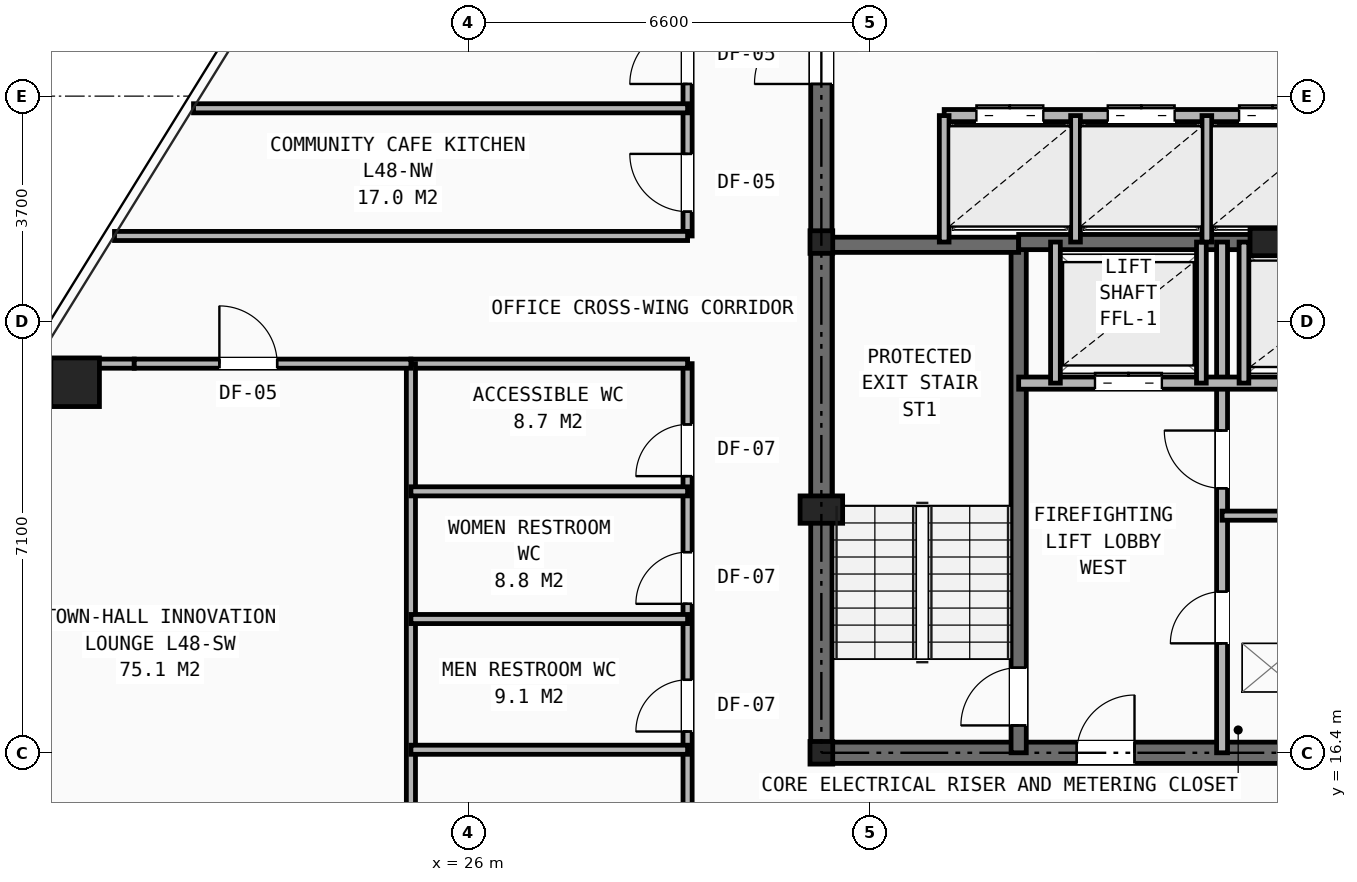
"""IFC4 building model, lengths in metres.
Left out: names, types, materials, properties, quantities, classifications, styles, units other than length and angle.
Written with IfcOpenShell. Run it as: python <this file> out.ifc"""

import sys

from ifc_helpers import new_model, si_unit, direction, frame, frame_2d, origin, origin_2d, place, context, subcontext, project, spatial, rectangle, hollow_rectangle, i_section, extrude, element, fill, save


model = new_model("IFC4")
c1 = context("Model", 3, precision=1e-05, world=origin(), true_north=direction((0.0, 1.0)))
c2 = subcontext(c1, "Body", "Model", "MODEL_VIEW")
j1 = project(units=[si_unit("LENGTHUNIT", "METRE"), si_unit("PLANEANGLEUNIT", "RADIAN")], contexts=[c1])
p1 = place(None, origin())
s1 = spatial("IfcSite", under=j1, at=p1, CompositionType="ELEMENT")
p2 = place(p1, origin())
s2 = spatial("IfcBuilding", under=s1, at=p2, CompositionType="ELEMENT")
p3 = place(p2, frame((0.0, 0.0, 168.9)))
s3 = spatial("IfcBuildingStorey", under=s2, at=p3, CompositionType="ELEMENT", Elevation=168.9)
for number, where, z_axis, x_axis in (
    (1, (31.8, 16.4, 0.0), (0.0, 0.0, 1.0), (1.0, 0.0, 0.0)),
    (2, (31.8, 24.8, 0.0), (0.0, 0.0, 1.0), (1.0, 0.0, 0.0)),
):
    element("IfcColumn", number, at=place(p3, frame(where, z_axis=z_axis, x_axis=x_axis)), inside=s3, PredefinedType="COLUMN", context=c2, shape_type="SweptSolid", body=[
        extrude(i_section(OverallWidth=0.374, OverallDepth=0.372, WebThickness=0.016, FlangeThickness=0.026, at=origin_2d()), origin(), (0.0, 0.0, 1.0), 3.45),
    ])
for number, where, z_axis, x_axis in (
    (3, (31.8, 20.4, 0.0), (0.0, 0.0, 1.0), (1.0, 0.0, 0.0)),
    (4, (39.2, 24.8, 0.0), (0.0, 0.0, 1.0), (1.0, 0.0, 0.0)),
):
    element("IfcColumn", number, at=place(p3, frame(where, z_axis=z_axis, x_axis=x_axis)), inside=s3, PredefinedType="PILASTER", context=c2, shape_type="SweptSolid", body=[
        extrude(rectangle(XDim=0.7, YDim=0.45, at=origin_2d()), origin(), (0.0, 0.0, 1.0), 3.45),
    ])
p4 = place(p3, frame((19.527, 22.494, 0.0), z_axis=(0.0, 0.0, 1.0), x_axis=(1.0, 0.0, 0.0)))
e5 = element("IfcColumn", 5, at=p4, inside=s3, PredefinedType="COLUMN", context=c2, shape_type="SweptSolid", body=[
    extrude(hollow_rectangle(XDim=0.8, YDim=0.8, WallThickness=0.055, at=origin_2d()), origin(), (0.0, 0.0, 1.0), 3.45),
])
p5 = place(p3, frame((31.8, 16.4, 0.0), z_axis=(0.0, 0.0, 1.0), x_axis=(1.0, 0.0, 0.0)))
e6 = element("IfcWall", 6, at=p5, inside=s3, PredefinedType="SHEAR", context=c2, shape_type="SweptSolid", body=[
    extrude(rectangle(XDim=16.4, YDim=0.35, at=frame_2d((8.2, 0.0))), origin(), (0.0, 0.0, 1.0), 3.21),
])
p6 = place(p5, frame((4.2, 0.0, 0.0)))
e7 = element("IfcOpeningElement", 7, at=p6, cuts=e6, PredefinedType="OPENING", context=c2, shape_type="SweptSolid", body=[
    extrude(rectangle(XDim=0.95, YDim=2.1, at=frame_2d((0.475, 1.05))), frame((0.0, 0.185, 0.0), z_axis=(0.0, -1.0, 0.0), x_axis=(1.0, 0.0, 0.0)), (0.0, 0.0, 1.0), 0.37),
])
p7 = place(p5, frame((10.6, 0.0, 0.0)))
e8 = element("IfcOpeningElement", 8, at=p7, cuts=e6, PredefinedType="OPENING", context=c2, shape_type="SweptSolid", body=[
    extrude(rectangle(XDim=0.95, YDim=2.1, at=frame_2d((0.475, 1.05))), frame((0.0, 0.185, 0.0), z_axis=(0.0, -1.0, 0.0), x_axis=(1.0, 0.0, 0.0)), (0.0, 0.0, 1.0), 0.37),
])
p8 = place(p3, frame((31.8, 16.4, 0.0), z_axis=(0.0, 0.0, 1.0), x_axis=(0.0, 1.0, 0.0)))
e9 = element("IfcWall", 9, at=p8, inside=s3, PredefinedType="SHEAR", context=c2, shape_type="SweptSolid", body=[
    extrude(rectangle(XDim=14.8, YDim=0.35, at=frame_2d((7.4, 0.0))), origin(), (0.0, 0.0, 1.0), 3.21),
])
p9 = place(p8, frame((11.0, 0.0, 0.0)))
e10 = element("IfcOpeningElement", 10, at=p9, cuts=e9, PredefinedType="OPENING", context=c2, shape_type="SweptSolid", body=[
    extrude(rectangle(XDim=1.1, YDim=2.15, at=frame_2d((0.55, 1.075))), frame((0.0, 0.185, 0.0), z_axis=(0.0, -1.0, 0.0), x_axis=(1.0, 0.0, 0.0)), (0.0, 0.0, 1.0), 0.37),
])
p10 = place(p3, frame((35.045, 16.4, 0.0), z_axis=(0.0, 0.0, 1.0), x_axis=(0.0, 1.0, 0.0)))
e11 = element("IfcWall", 11, at=p10, inside=s3, PredefinedType="SHEAR", context=c2, shape_type="SweptSolid", body=[
    extrude(rectangle(XDim=8.4, YDim=0.25, at=frame_2d((4.2, 0.0))), origin(), (0.0, 0.0, 1.0), 3.21),
])
p11 = place(p10, frame((0.45, 0.0, 0.0)))
e12 = element("IfcOpeningElement", 12, at=p11, cuts=e11, PredefinedType="OPENING", context=c2, shape_type="SweptSolid", body=[
    extrude(rectangle(XDim=0.95, YDim=2.1, at=frame_2d((0.475, 1.05))), frame((0.0, 0.135, 0.0), z_axis=(0.0, -1.0, 0.0), x_axis=(1.0, 0.0, 0.0)), (0.0, 0.0, 1.0), 0.27),
])
p12 = place(p3, frame((31.8, 24.755, 0.0), z_axis=(0.0, 0.0, 1.0), x_axis=(1.0, 0.0, 0.0)))
e13 = element("IfcWall", 13, at=p12, inside=s3, PredefinedType="SHEAR", context=c2, shape_type="SweptSolid", body=[
    extrude(rectangle(XDim=3.245, YDim=0.25, at=frame_2d((1.623, 0.0))), origin(), (0.0, 0.0, 1.0), 3.21),
])
p13 = place(p3, frame((35.045, 24.8, 0.0), z_axis=(0.0, 0.0, 1.0), x_axis=(1.0, 0.0, 0.0)))
e14 = element("IfcWall", 14, at=p13, inside=s3, PredefinedType="SHEAR", context=c2, shape_type="SweptSolid", body=[
    extrude(rectangle(XDim=9.91, YDim=0.25, at=frame_2d((4.955, 0.0))), origin(), (0.0, 0.0, 1.0), 3.21),
])
p14 = place(p3, frame((38.39, 16.4, 0.0), z_axis=(0.0, 0.0, 1.0), x_axis=(0.0, 1.0, 0.0)))
e15 = element("IfcWall", 15, at=p14, inside=s3, PredefinedType="PARTITIONING", context=c2, shape_type="SweptSolid", body=[
    extrude(rectangle(XDim=8.4, YDim=0.18, at=frame_2d((4.2, 0.0))), origin(), (0.0, 0.0, 1.0), 2.665),
])
p15 = place(p14, frame((1.8, 0.0, 0.0)))
e16 = element("IfcOpeningElement", 16, at=p15, cuts=e15, PredefinedType="OPENING", context=c2, shape_type="SweptSolid", body=[
    extrude(rectangle(XDim=0.85, YDim=2.05, at=frame_2d((0.425, 1.025))), frame((0.0, 0.1, 0.0), z_axis=(0.0, -1.0, 0.0), x_axis=(1.0, 0.0, 0.0)), (0.0, 0.0, 1.0), 0.2),
])
p16 = place(p14, frame((4.35, 0.0, 0.0)))
e17 = element("IfcOpeningElement", 17, at=p16, cuts=e15, PredefinedType="OPENING", context=c2, shape_type="SweptSolid", body=[
    extrude(rectangle(XDim=0.95, YDim=2.1, at=frame_2d((0.475, 1.05))), frame((0.0, 0.1, 0.0), z_axis=(0.0, -1.0, 0.0), x_axis=(1.0, 0.0, 0.0)), (0.0, 0.0, 1.0), 0.2),
])
p17 = place(p3, frame((35.045, 22.48, 0.0), z_axis=(0.0, 0.0, 1.0), x_axis=(1.0, 0.0, 0.0)))
e18 = element("IfcWall", 18, at=p17, inside=s3, PredefinedType="SOLIDWALL", context=c2, shape_type="SweptSolid", body=[
    extrude(rectangle(XDim=9.91, YDim=0.2, at=frame_2d((4.955, 0.0))), origin(), (0.0, 0.0, 1.0), 3.21),
])
p18 = place(p17, frame((1.255, 0.0, 0.0)))
e19 = element("IfcOpeningElement", 19, at=p18, cuts=e18, PredefinedType="OPENING", context=c2, shape_type="SweptSolid", body=[
    extrude(rectangle(XDim=1.1, YDim=2.15, at=frame_2d((0.55, 1.075))), frame((0.0, 0.11, 0.0), z_axis=(0.0, -1.0, 0.0), x_axis=(1.0, 0.0, 0.0)), (0.0, 0.0, 1.0), 0.22),
])
p19 = place(p17, frame((7.555, 0.0, 0.0)))
e20 = element("IfcOpeningElement", 20, at=p19, cuts=e18, PredefinedType="OPENING", context=c2, shape_type="SweptSolid", body=[
    extrude(rectangle(XDim=1.1, YDim=2.15, at=frame_2d((0.55, 1.075))), frame((0.0, 0.11, 0.0), z_axis=(0.0, -1.0, 0.0), x_axis=(1.0, 0.0, 0.0)), (0.0, 0.0, 1.0), 0.22),
])
p20 = place(p17, frame((4.405, 0.0, 0.0)))
e21 = element("IfcOpeningElement", 21, at=p20, cuts=e18, PredefinedType="OPENING", context=c2, shape_type="SweptSolid", body=[
    extrude(rectangle(XDim=1.1, YDim=2.15, at=frame_2d((0.55, 1.075))), frame((0.0, 0.11, 0.0), z_axis=(0.0, -1.0, 0.0), x_axis=(1.0, 0.0, 0.0)), (0.0, 0.0, 1.0), 0.22),
])
p21 = place(p3, frame((38.39, 20.3, 0.0), z_axis=(0.0, 0.0, 1.0), x_axis=(1.0, 0.0, 0.0)))
e22 = element("IfcWall", 22, at=p21, inside=s3, PredefinedType="PARTITIONING", context=c2, shape_type="SweptSolid", body=[
    extrude(rectangle(XDim=3.22, YDim=0.15, at=frame_2d((1.61, 0.0))), origin(), (0.0, 0.0, 1.0), 3.21),
])
for number, where, z_axis, x_axis in (
    (23, (35.65, 22.48, 0.0), (0.0, 0.0, 1.0), (0.0, 1.0, 0.0)),
    (24, (38.05, 22.48, 0.0), (0.0, 0.0, 1.0), (0.0, 1.0, 0.0)),
    (25, (38.75, 22.48, 0.0), (0.0, 0.0, 1.0), (0.0, 1.0, 0.0)),
):
    element("IfcWall", number, at=place(p3, frame(where, z_axis=z_axis, x_axis=x_axis)), inside=s3, PredefinedType="SOLIDWALL", context=c2, shape_type="SweptSolid", body=[
        extrude(rectangle(XDim=2.32, YDim=0.16, at=frame_2d((1.16, 0.0))), origin(), (0.0, 0.0, 1.0), 3.21),
    ])
p22 = place(p3, frame((33.82, 26.88, 0.0), z_axis=(0.0, 0.0, 1.0), x_axis=(1.0, 0.0, 0.0)))
e26 = element("IfcWall", 26, at=p22, inside=s3, PredefinedType="SOLIDWALL", context=c2, shape_type="SweptSolid", body=[
    extrude(rectangle(XDim=14.38, YDim=0.2, at=frame_2d((7.19, 0.0))), origin(), (0.0, 0.0, 1.0), 2.665),
])
p23 = place(p22, frame((0.53, 0.0, 0.0)))
e27 = element("IfcOpeningElement", 27, at=p23, cuts=e26, PredefinedType="OPENING", context=c2, shape_type="SweptSolid", body=[
    extrude(rectangle(XDim=1.1, YDim=2.15, at=frame_2d((0.55, 1.075))), frame((0.0, 0.11, 0.0), z_axis=(0.0, -1.0, 0.0), x_axis=(1.0, 0.0, 0.0)), (0.0, 0.0, 1.0), 0.22),
])
p24 = place(p22, frame((2.69, 0.0, 0.0)))
e28 = element("IfcOpeningElement", 28, at=p24, cuts=e26, PredefinedType="OPENING", context=c2, shape_type="SweptSolid", body=[
    extrude(rectangle(XDim=1.1, YDim=2.15, at=frame_2d((0.55, 1.075))), frame((0.0, 0.11, 0.0), z_axis=(0.0, -1.0, 0.0), x_axis=(1.0, 0.0, 0.0)), (0.0, 0.0, 1.0), 0.22),
])
p25 = place(p22, frame((4.85, 0.0, 0.0)))
e29 = element("IfcOpeningElement", 29, at=p25, cuts=e26, PredefinedType="OPENING", context=c2, shape_type="SweptSolid", body=[
    extrude(rectangle(XDim=1.1, YDim=2.15, at=frame_2d((0.55, 1.075))), frame((0.0, 0.11, 0.0), z_axis=(0.0, -1.0, 0.0), x_axis=(1.0, 0.0, 0.0)), (0.0, 0.0, 1.0), 0.22),
])
p26 = place(p22, frame((7.01, 0.0, 0.0)))
e30 = element("IfcOpeningElement", 30, at=p26, cuts=e26, PredefinedType="OPENING", context=c2, shape_type="SweptSolid", body=[
    extrude(rectangle(XDim=1.1, YDim=2.15, at=frame_2d((0.55, 1.075))), frame((0.0, 0.11, 0.0), z_axis=(0.0, -1.0, 0.0), x_axis=(1.0, 0.0, 0.0)), (0.0, 0.0, 1.0), 0.22),
])
for number, where, z_axis, x_axis in (
    (31, (33.82, 24.8, 0.0), (0.0, 0.0, 1.0), (0.0, 1.0, 0.0)),
    (32, (35.98, 24.8, 0.0), (0.0, 0.0, 1.0), (0.0, 1.0, 0.0)),
    (33, (38.14, 24.8, 0.0), (0.0, 0.0, 1.0), (0.0, 1.0, 0.0)),
):
    element("IfcWall", number, at=place(p3, frame(where, z_axis=z_axis, x_axis=x_axis)), inside=s3, PredefinedType="SOLIDWALL", context=c2, shape_type="SweptSolid", body=[
        extrude(rectangle(XDim=2.08, YDim=0.16, at=frame_2d((1.04, 0.0))), origin(), (0.0, 0.0, 1.0), 3.21),
    ])
p27 = place(p3, frame((29.6, 14.1, 0.0), z_axis=(0.0, 0.0, 1.0), x_axis=(0.0, 1.0, 0.0)))
e34 = element("IfcWall", 34, at=p27, inside=s3, PredefinedType="PARTITIONING", context=c2, shape_type="SweptSolid", body=[
    extrude(rectangle(XDim=8.7, YDim=0.15, at=frame_2d((4.35, 0.0))), origin(), (0.0, 0.0, 1.0), 3.21),
])
p28 = place(p27, frame((2.65, 0.0, 0.0)))
e35 = element("IfcOpeningElement", 35, at=p28, cuts=e34, PredefinedType="OPENING", context=c2, shape_type="SweptSolid", body=[
    extrude(rectangle(XDim=0.85, YDim=2.05, at=frame_2d((0.425, 1.025))), frame((0.0, 0.085, 0.0), z_axis=(0.0, -1.0, 0.0), x_axis=(1.0, 0.0, 0.0)), (0.0, 0.0, 1.0), 0.17),
])
p29 = place(p27, frame((4.75, 0.0, 0.0)))
e36 = element("IfcOpeningElement", 36, at=p29, cuts=e34, PredefinedType="OPENING", context=c2, shape_type="SweptSolid", body=[
    extrude(rectangle(XDim=0.85, YDim=2.05, at=frame_2d((0.425, 1.025))), frame((0.0, 0.085, 0.0), z_axis=(0.0, -1.0, 0.0), x_axis=(1.0, 0.0, 0.0)), (0.0, 0.0, 1.0), 0.17),
])
p30 = place(p27, frame((6.85, 0.0, 0.0)))
e37 = element("IfcOpeningElement", 37, at=p30, cuts=e34, PredefinedType="OPENING", context=c2, shape_type="SweptSolid", body=[
    extrude(rectangle(XDim=0.85, YDim=2.05, at=frame_2d((0.425, 1.025))), frame((0.0, 0.085, 0.0), z_axis=(0.0, -1.0, 0.0), x_axis=(1.0, 0.0, 0.0)), (0.0, 0.0, 1.0), 0.17),
])
p31 = place(p3, frame((29.6, 24.9, 0.0), z_axis=(0.0, 0.0, 1.0), x_axis=(0.0, 1.0, 0.0)))
e38 = element("IfcWall", 38, at=p31, inside=s3, PredefinedType="PARTITIONING", context=c2, shape_type="SweptSolid", body=[
    extrude(rectangle(XDim=13.9, YDim=0.15, at=frame_2d((6.95, 0.0))), origin(), (0.0, 0.0, 1.0), 2.225),
])
p32 = place(p31, frame((0.4, 0.0, 0.0)))
e39 = element("IfcOpeningElement", 39, at=p32, cuts=e38, PredefinedType="OPENING", context=c2, shape_type="SweptSolid", body=[
    extrude(rectangle(XDim=0.95, YDim=2.1, at=frame_2d((0.475, 1.05))), frame((0.0, 0.085, 0.0), z_axis=(0.0, -1.0, 0.0), x_axis=(1.0, 0.0, 0.0)), (0.0, 0.0, 1.0), 0.17),
])
p33 = place(p31, frame((2.5, 0.0, 0.0)))
e40 = element("IfcOpeningElement", 40, at=p33, cuts=e38, PredefinedType="OPENING", context=c2, shape_type="SweptSolid", body=[
    extrude(rectangle(XDim=0.95, YDim=2.1, at=frame_2d((0.475, 1.05))), frame((0.0, 0.085, 0.0), z_axis=(0.0, -1.0, 0.0), x_axis=(1.0, 0.0, 0.0)), (0.0, 0.0, 1.0), 0.17),
])
p34 = place(p3, frame((18.876, 22.8, 0.0), z_axis=(0.0, 0.0, 1.0), x_axis=(1.0, 0.0, 0.0)))
e41 = element("IfcWall", 41, at=p34, inside=s3, PredefinedType="PARTITIONING", context=c2, shape_type="SweptSolid", body=[
    extrude(rectangle(XDim=1.624, YDim=0.15, at=frame_2d((0.812, 0.0))), origin(), (0.0, 0.0, 1.0), 2.589),
])
p35 = place(p3, frame((25.05, 22.8, 0.0), z_axis=(0.0, 0.0, 1.0), x_axis=(1.0, 0.0, 0.0)))
e42 = element("IfcWall", 42, at=p35, inside=s3, PredefinedType="PARTITIONING", context=c2, shape_type="SweptSolid", body=[
    extrude(rectangle(XDim=4.55, YDim=0.15, at=frame_2d((2.275, 0.0))), origin(), (0.0, 0.0, 1.0), 3.21),
])
p36 = place(p3, frame((20.175, 24.9, 0.0), z_axis=(0.0, 0.0, 1.0), x_axis=(1.0, 0.0, 0.0)))
e43 = element("IfcWall", 43, at=p36, inside=s3, PredefinedType="PARTITIONING", context=c2, shape_type="SweptSolid", body=[
    extrude(rectangle(XDim=9.425, YDim=0.15, at=frame_2d((4.712, 0.0))), origin(), (0.0, 0.0, 1.0), 2.589),
])
p37 = place(p3, frame((25.05, 14.1, 0.0), z_axis=(0.0, 0.0, 1.0), x_axis=(0.0, 1.0, 0.0)))
e44 = element("IfcWall", 44, at=p37, inside=s3, PredefinedType="PARTITIONING", context=c2, shape_type="SweptSolid", body=[
    extrude(rectangle(XDim=8.7, YDim=0.15, at=frame_2d((4.35, 0.0))), origin(), (0.0, 0.0, 1.0), 3.21),
])
for number, where, z_axis, x_axis in (
    (45, (25.05, 16.45, 0.0), (0.0, 0.0, 1.0), (1.0, 0.0, 0.0)),
    (46, (25.05, 18.6, 0.0), (0.0, 0.0, 1.0), (1.0, 0.0, 0.0)),
    (47, (25.05, 20.7, 0.0), (0.0, 0.0, 1.0), (1.0, 0.0, 0.0)),
):
    element("IfcWall", number, at=place(p3, frame(where, z_axis=z_axis, x_axis=x_axis)), inside=s3, PredefinedType="PARTITIONING", context=c2, shape_type="SweptSolid", body=[
        extrude(rectangle(XDim=4.55, YDim=0.15, at=frame_2d((2.275, 0.0))), origin(), (0.0, 0.0, 1.0), 3.21),
    ])
p38 = place(p3, frame((20.5, 22.8, 0.0), z_axis=(0.0, 0.0, 1.0), x_axis=(1.0, 0.0, 0.0)))
e48 = element("IfcWall", 48, at=p38, inside=s3, PredefinedType="PARTITIONING", context=c2, shape_type="SweptSolid", body=[
    extrude(rectangle(XDim=4.55, YDim=0.15, at=frame_2d((2.275, 0.0))), origin(), (0.0, 0.0, 1.0), 3.21),
])
p39 = place(p38, frame((1.4, 0.0, 0.0)))
e49 = element("IfcOpeningElement", 49, at=p39, cuts=e48, PredefinedType="OPENING", context=c2, shape_type="SweptSolid", body=[
    extrude(rectangle(XDim=0.95, YDim=2.1, at=frame_2d((0.475, 1.05))), frame((0.0, 0.085, 0.0), z_axis=(0.0, -1.0, 0.0), x_axis=(1.0, 0.0, 0.0)), (0.0, 0.0, 1.0), 0.17),
])
p40 = place(p3, frame((21.475, 27.0, 0.0), z_axis=(0.0, 0.0, 1.0), x_axis=(1.0, 0.0, 0.0)))
e50 = element("IfcWall", 50, at=p40, inside=s3, PredefinedType="PARTITIONING", context=c2, shape_type="SweptSolid", body=[
    extrude(rectangle(XDim=8.125, YDim=0.15, at=frame_2d((4.063, 0.0))), origin(), (0.0, 0.0, 1.0), 2.589),
])
p41 = place(p15, origin())
e51 = element("IfcDoor", 51, at=p41, inside=s3, OperationType="SINGLE_SWING_LEFT", PredefinedType="DOOR", context=c2, shape_type="SweptSolid", body=[
    extrude(rectangle(XDim=0.85, YDim=2.05, at=frame_2d((0.425, 1.025))), frame((0.0, 0.025, 0.0), z_axis=(0.0, -1.0, 0.0), x_axis=(1.0, 0.0, 0.0)), (0.0, 0.0, 1.0), 0.05),
])
fill(e16, e51)
p42 = place(p16, origin())
e52 = element("IfcDoor", 52, at=p42, inside=s3, OperationType="SINGLE_SWING_RIGHT", PredefinedType="DOOR", context=c2, shape_type="SweptSolid", body=[
    extrude(rectangle(XDim=0.95, YDim=2.1, at=frame_2d((0.475, 1.05))), frame((0.0, 0.025, 0.0), z_axis=(0.0, -1.0, 0.0), x_axis=(1.0, 0.0, 0.0)), (0.0, 0.0, 1.0), 0.05),
])
fill(e17, e52)
p43 = place(p11, origin())
e53 = element("IfcDoor", 53, at=p43, inside=s3, OperationType="SINGLE_SWING_LEFT", PredefinedType="DOOR", context=c2, shape_type="SweptSolid", body=[
    extrude(rectangle(XDim=0.95, YDim=2.1, at=frame_2d((0.475, 1.05))), frame((0.0, 0.025, 0.0), z_axis=(0.0, -1.0, 0.0), x_axis=(1.0, 0.0, 0.0)), (0.0, 0.0, 1.0), 0.05),
])
fill(e12, e53)
p44 = place(p6, origin())
e54 = element("IfcDoor", 54, at=p44, inside=s3, OperationType="SINGLE_SWING_RIGHT", PredefinedType="DOOR", context=c2, shape_type="SweptSolid", body=[
    extrude(rectangle(XDim=0.95, YDim=2.1, at=frame_2d((0.475, 1.05))), frame((0.0, 0.025, 0.0), z_axis=(0.0, -1.0, 0.0), x_axis=(1.0, 0.0, 0.0)), (0.0, 0.0, 1.0), 0.05),
])
fill(e7, e54)
p45 = place(p18, origin())
e55 = element("IfcDoor", 55, at=p45, inside=s3, OperationType="DOUBLE_DOOR_SLIDING", PredefinedType="DOOR", context=c2, shape_type="SweptSolid", body=[
    extrude(rectangle(XDim=1.1, YDim=2.15, at=frame_2d((0.55, 1.075))), frame((0.0, 0.025, 0.0), z_axis=(0.0, -1.0, 0.0), x_axis=(1.0, 0.0, 0.0)), (0.0, 0.0, 1.0), 0.05),
])
fill(e19, e55)
p46 = place(p9, origin())
e56 = element("IfcDoor", 56, at=p46, inside=s3, OperationType="SINGLE_SWING_LEFT", PredefinedType="DOOR", context=c2, shape_type="SweptSolid", body=[
    extrude(rectangle(XDim=1.1, YDim=2.15, at=frame_2d((0.55, 1.075))), frame((0.0, 0.025, 0.0), z_axis=(0.0, -1.0, 0.0), x_axis=(1.0, 0.0, 0.0)), (0.0, 0.0, 1.0), 0.05),
])
fill(e10, e56)
p47 = place(p23, origin())
e57 = element("IfcDoor", 57, at=p47, inside=s3, OperationType="DOUBLE_DOOR_SLIDING", PredefinedType="DOOR", context=c2, shape_type="SweptSolid", body=[
    extrude(rectangle(XDim=1.1, YDim=2.15, at=frame_2d((0.55, 1.075))), frame((0.0, 0.025, 0.0), z_axis=(0.0, -1.0, 0.0), x_axis=(1.0, 0.0, 0.0)), (0.0, 0.0, 1.0), 0.05),
])
fill(e27, e57)
p48 = place(p24, origin())
e58 = element("IfcDoor", 58, at=p48, inside=s3, OperationType="DOUBLE_DOOR_SLIDING", PredefinedType="DOOR", context=c2, shape_type="SweptSolid", body=[
    extrude(rectangle(XDim=1.1, YDim=2.15, at=frame_2d((0.55, 1.075))), frame((0.0, 0.025, 0.0), z_axis=(0.0, -1.0, 0.0), x_axis=(1.0, 0.0, 0.0)), (0.0, 0.0, 1.0), 0.05),
])
fill(e28, e58)
p49 = place(p25, origin())
e59 = element("IfcDoor", 59, at=p49, inside=s3, OperationType="DOUBLE_DOOR_SLIDING", PredefinedType="DOOR", context=c2, shape_type="SweptSolid", body=[
    extrude(rectangle(XDim=1.1, YDim=2.15, at=frame_2d((0.55, 1.075))), frame((0.0, 0.025, 0.0), z_axis=(0.0, -1.0, 0.0), x_axis=(1.0, 0.0, 0.0)), (0.0, 0.0, 1.0), 0.05),
])
fill(e29, e59)
p50 = place(p28, origin())
e60 = element("IfcDoor", 60, at=p50, inside=s3, OperationType="SINGLE_SWING_LEFT", PredefinedType="DOOR", context=c2, shape_type="SweptSolid", body=[
    extrude(rectangle(XDim=0.85, YDim=2.05, at=frame_2d((0.425, 1.025))), frame((0.0, 0.025, 0.0), z_axis=(0.0, -1.0, 0.0), x_axis=(1.0, 0.0, 0.0)), (0.0, 0.0, 1.0), 0.05),
])
fill(e35, e60)
p51 = place(p29, origin())
e61 = element("IfcDoor", 61, at=p51, inside=s3, OperationType="SINGLE_SWING_LEFT", PredefinedType="DOOR", context=c2, shape_type="SweptSolid", body=[
    extrude(rectangle(XDim=0.85, YDim=2.05, at=frame_2d((0.425, 1.025))), frame((0.0, 0.025, 0.0), z_axis=(0.0, -1.0, 0.0), x_axis=(1.0, 0.0, 0.0)), (0.0, 0.0, 1.0), 0.05),
])
fill(e36, e61)
p52 = place(p30, origin())
e62 = element("IfcDoor", 62, at=p52, inside=s3, OperationType="SINGLE_SWING_LEFT", PredefinedType="DOOR", context=c2, shape_type="SweptSolid", body=[
    extrude(rectangle(XDim=0.85, YDim=2.05, at=frame_2d((0.425, 1.025))), frame((0.0, 0.025, 0.0), z_axis=(0.0, -1.0, 0.0), x_axis=(1.0, 0.0, 0.0)), (0.0, 0.0, 1.0), 0.05),
])
fill(e37, e62)
p53 = place(p39, origin())
e63 = element("IfcDoor", 63, at=p53, inside=s3, OperationType="SINGLE_SWING_LEFT", PredefinedType="DOOR", context=c2, shape_type="SweptSolid", body=[
    extrude(rectangle(XDim=0.95, YDim=2.1, at=frame_2d((0.475, 1.05))), frame((0.0, 0.025, 0.0), z_axis=(0.0, -1.0, 0.0), x_axis=(1.0, 0.0, 0.0)), (0.0, 0.0, 1.0), 0.05),
])
fill(e49, e63)
p54 = place(p32, origin())
e64 = element("IfcDoor", 64, at=p54, inside=s3, OperationType="SINGLE_SWING_RIGHT", PredefinedType="DOOR", context=c2, shape_type="SweptSolid", body=[
    extrude(rectangle(XDim=0.95, YDim=2.1, at=frame_2d((0.475, 1.05))), frame((0.0, 0.025, 0.0), z_axis=(0.0, -1.0, 0.0), x_axis=(1.0, 0.0, 0.0)), (0.0, 0.0, 1.0), 0.05),
])
fill(e39, e64)
p55 = place(p33, origin())
e65 = element("IfcDoor", 65, at=p55, inside=s3, OperationType="SINGLE_SWING_LEFT", PredefinedType="DOOR", context=c2, shape_type="SweptSolid", body=[
    extrude(rectangle(XDim=0.95, YDim=2.1, at=frame_2d((0.475, 1.05))), frame((0.0, 0.025, 0.0), z_axis=(0.0, -1.0, 0.0), x_axis=(1.0, 0.0, 0.0)), (0.0, 0.0, 1.0), 0.05),
])
fill(e40, e65)
save(model, sys.argv[1])
